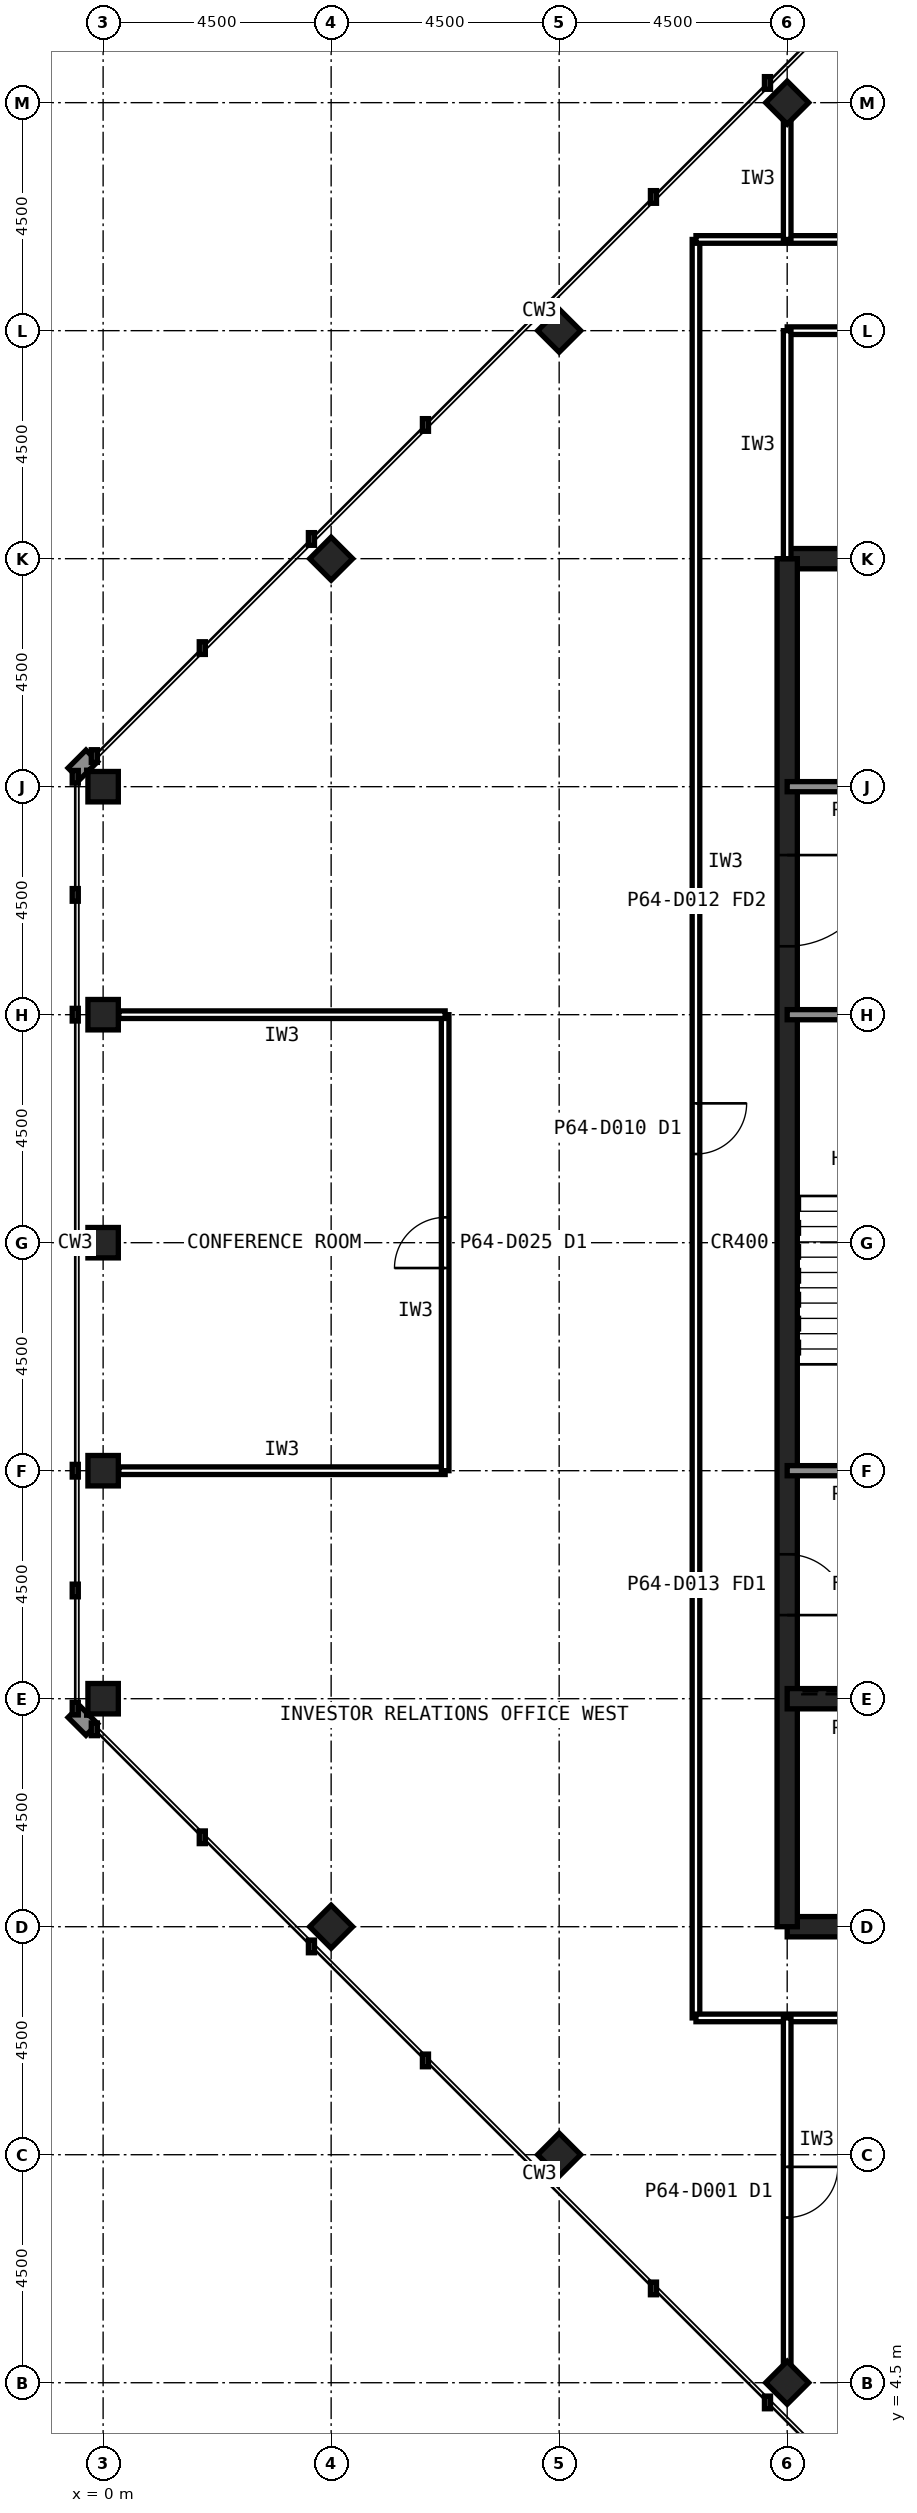
"""IFC4 building model, lengths in metres.
Left out: names, types, materials, properties, quantities, classifications, styles, units other than length and angle.
Written with IfcOpenShell. Run it as: python <this file> out.ifc"""

import sys

from ifc_helpers import new_model, si_unit, direction, frame, frame_2d, origin, origin_2d, place, context, subcontext, project, spatial, rectangle, hollow_rectangle, extrude, element, fill, save


model = new_model("IFC4")
c1 = context("Model", 3, precision=1e-05, world=origin(), true_north=direction((0.0, 1.0)))
c2 = subcontext(c1, "Body", "Model", "MODEL_VIEW")
j1 = project(units=[si_unit("LENGTHUNIT", "METRE"), si_unit("PLANEANGLEUNIT", "RADIAN")], contexts=[c1])
p1 = place(None, origin())
s1 = spatial("IfcSite", under=j1, at=p1, CompositionType="ELEMENT")
p2 = place(p1, origin())
s2 = spatial("IfcBuilding", under=s1, at=p2, CompositionType="ELEMENT")
p3 = place(p2, frame((0.0, 0.0, 270.6)))
s3 = spatial("IfcBuildingStorey", under=s2, at=p3, CompositionType="ELEMENT", Elevation=270.6)
for number, where, z_axis, x_axis in (
    (1, (0.0, 36.0, 0.0), (0.0, 0.0, 1.0), (1.0, 0.0, 0.0)),
    (2, (0.0, 31.5, 0.0), (0.0, 0.0, 1.0), (1.0, 0.0, 0.0)),
    (3, (0.0, 27.0, 0.0), (0.0, 0.0, 1.0), (1.0, 0.0, 0.0)),
    (4, (0.0, 22.5, 0.0), (0.0, 0.0, 1.0), (1.0, 0.0, 0.0)),
    (5, (0.0, 18.0, 0.0), (0.0, 0.0, 1.0), (1.0, 0.0, 0.0)),
    (6, (13.5, 4.5, 0.0), (0.0, 0.0, 1.0), (0.707, 0.707, 0.0)),
    (7, (9.0, 9.0, 0.0), (0.0, 0.0, 1.0), (0.707, 0.707, 0.0)),
    (8, (4.5, 13.5, 0.0), (0.0, 0.0, 1.0), (0.707, 0.707, 0.0)),
    (9, (4.5, 40.5, 0.0), (0.0, 0.0, 1.0), (0.707, 0.707, 0.0)),
    (10, (9.0, 45.0, 0.0), (0.0, 0.0, 1.0), (0.707, 0.707, 0.0)),
    (11, (13.5, 49.5, 0.0), (0.0, 0.0, 1.0), (0.707, 0.707, 0.0)),
):
    element("IfcColumn", number, at=place(p3, frame(where, z_axis=z_axis, x_axis=x_axis)), inside=s3, PredefinedType="COLUMN", context=c2, shape_type="SweptSolid", body=[
        extrude(hollow_rectangle(XDim=0.6, YDim=0.6, WallThickness=0.028, at=origin_2d()), origin(), (0.0, 0.0, 1.0), 4.0),
    ])
for number, where, z_axis, x_axis in (
    (12, (13.5, 13.5, 0.0), (0.0, 0.0, 1.0), (1.0, 0.0, 0.0)),
    (13, (40.5, 40.5, 0.0), (0.0, 0.0, 1.0), (-1.0, 0.0, 0.0)),
):
    element("IfcWall", number, at=place(p3, frame(where, z_axis=z_axis, x_axis=x_axis)), inside=s3, PredefinedType="SHEAR", context=c2, shape_type="SweptSolid", body=[
        extrude(rectangle(XDim=27.0, YDim=0.4, at=frame_2d((13.5, 0.0))), origin(), (0.0, 0.0, 1.0), 4.0),
    ])
p4 = place(p3, frame((13.5, 40.5, 0.0), z_axis=(0.0, 0.0, 1.0), x_axis=(0.0, -1.0, 0.0)))
e14 = element("IfcWall", 14, at=p4, inside=s3, PredefinedType="SHEAR", context=c2, shape_type="SweptSolid", body=[
    extrude(rectangle(XDim=27.0, YDim=0.4, at=frame_2d((13.5, 0.0))), origin(), (0.0, 0.0, 1.0), 4.0),
])
p5 = place(p4, frame((19.65, 0.0, 0.0)))
e15 = element("IfcOpeningElement", 15, at=p5, cuts=e14, PredefinedType="OPENING", context=c2, shape_type="SweptSolid", body=[
    extrude(rectangle(XDim=1.2, YDim=2.1, at=frame_2d((0.6, 1.05))), frame((0.0, 0.21, 0.0), z_axis=(0.0, -1.0, 0.0), x_axis=(1.0, 0.0, 0.0)), (0.0, 0.0, 1.0), 0.42),
])
p6 = place(p4, frame((5.85, 0.0, 0.0)))
e16 = element("IfcOpeningElement", 16, at=p6, cuts=e14, PredefinedType="OPENING", context=c2, shape_type="SweptSolid", body=[
    extrude(rectangle(XDim=1.8, YDim=2.1, at=frame_2d((0.9, 1.05))), frame((0.0, 0.21, 0.0), z_axis=(0.0, -1.0, 0.0), x_axis=(1.0, 0.0, 0.0)), (0.0, 0.0, 1.0), 0.42),
])
p7 = place(p3, frame((13.5, 18.0, 0.0), z_axis=(0.0, 0.0, 1.0), x_axis=(1.0, 0.0, 0.0)))
e17 = element("IfcWall", 17, at=p7, inside=s3, PredefinedType="SHEAR", context=c2, shape_type="SweptSolid", body=[
    extrude(rectangle(XDim=27.0, YDim=0.4, at=frame_2d((13.5, 0.0))), origin(), (0.0, 0.0, 1.0), 4.0),
])
p8 = place(p7, frame((24.3, 0.0, 0.0)))
e18 = element("IfcOpeningElement", 18, at=p8, cuts=e17, PredefinedType="OPENING", context=c2, shape_type="SweptSolid", body=[
    extrude(rectangle(XDim=0.9, YDim=2.1, at=frame_2d((0.45, 1.05))), frame((0.0, 0.21, 0.0), z_axis=(0.0, -1.0, 0.0), x_axis=(1.0, 0.0, 0.0)), (0.0, 0.0, 1.0), 0.42),
])
p9 = place(p7, frame((5.45, 0.0, 0.0)))
e19 = element("IfcOpeningElement", 19, at=p9, cuts=e17, PredefinedType="OPENING", context=c2, shape_type="SweptSolid", body=[
    extrude(rectangle(XDim=1.1, YDim=2.1, at=frame_2d((0.55, 1.05))), frame((0.0, 0.21, 0.0), z_axis=(0.0, -1.0, 0.0), x_axis=(1.0, 0.0, 0.0)), (0.0, 0.0, 1.0), 0.42),
])
p10 = place(p7, frame((8.45, 0.0, 0.0)))
e20 = element("IfcOpeningElement", 20, at=p10, cuts=e17, PredefinedType="OPENING", context=c2, shape_type="SweptSolid", body=[
    extrude(rectangle(XDim=1.1, YDim=2.1, at=frame_2d((0.55, 1.05))), frame((0.0, 0.21, 0.0), z_axis=(0.0, -1.0, 0.0), x_axis=(1.0, 0.0, 0.0)), (0.0, 0.0, 1.0), 0.42),
])
p11 = place(p7, frame((11.45, 0.0, 0.0)))
e21 = element("IfcOpeningElement", 21, at=p11, cuts=e17, PredefinedType="OPENING", context=c2, shape_type="SweptSolid", body=[
    extrude(rectangle(XDim=1.1, YDim=2.1, at=frame_2d((0.55, 1.05))), frame((0.0, 0.21, 0.0), z_axis=(0.0, -1.0, 0.0), x_axis=(1.0, 0.0, 0.0)), (0.0, 0.0, 1.0), 0.42),
])
p12 = place(p7, frame((14.45, 0.0, 0.0)))
e22 = element("IfcOpeningElement", 22, at=p12, cuts=e17, PredefinedType="OPENING", context=c2, shape_type="SweptSolid", body=[
    extrude(rectangle(XDim=1.1, YDim=2.1, at=frame_2d((0.55, 1.05))), frame((0.0, 0.21, 0.0), z_axis=(0.0, -1.0, 0.0), x_axis=(1.0, 0.0, 0.0)), (0.0, 0.0, 1.0), 0.42),
])
p13 = place(p7, frame((17.45, 0.0, 0.0)))
e23 = element("IfcOpeningElement", 23, at=p13, cuts=e17, PredefinedType="OPENING", context=c2, shape_type="SweptSolid", body=[
    extrude(rectangle(XDim=1.1, YDim=2.1, at=frame_2d((0.55, 1.05))), frame((0.0, 0.21, 0.0), z_axis=(0.0, -1.0, 0.0), x_axis=(1.0, 0.0, 0.0)), (0.0, 0.0, 1.0), 0.42),
])
p14 = place(p7, frame((20.45, 0.0, 0.0)))
e24 = element("IfcOpeningElement", 24, at=p14, cuts=e17, PredefinedType="OPENING", context=c2, shape_type="SweptSolid", body=[
    extrude(rectangle(XDim=1.1, YDim=2.1, at=frame_2d((0.55, 1.05))), frame((0.0, 0.21, 0.0), z_axis=(0.0, -1.0, 0.0), x_axis=(1.0, 0.0, 0.0)), (0.0, 0.0, 1.0), 0.42),
])
p15 = place(p7, frame((1.6, 0.0, 0.0)))
e25 = element("IfcOpeningElement", 25, at=p15, cuts=e17, PredefinedType="OPENING", context=c2, shape_type="SweptSolid", body=[
    extrude(rectangle(XDim=1.3, YDim=2.2, at=frame_2d((0.65, 1.1))), frame((0.0, 0.21, 0.0), z_axis=(0.0, -1.0, 0.0), x_axis=(1.0, 0.0, 0.0)), (0.0, 0.0, 1.0), 0.42),
])
p16 = place(p3, frame((13.5, 36.0, 0.0), z_axis=(0.0, 0.0, 1.0), x_axis=(1.0, 0.0, 0.0)))
e26 = element("IfcWall", 26, at=p16, inside=s3, PredefinedType="SOLIDWALL", context=c2, shape_type="SweptSolid", body=[
    extrude(rectangle(XDim=27.0, YDim=0.2, at=frame_2d((13.5, 0.0))), origin(), (0.0, 0.0, 1.0), 3.84),
])
p17 = place(p16, frame((1.8, 0.0, 0.0)))
e27 = element("IfcOpeningElement", 27, at=p17, cuts=e26, PredefinedType="OPENING", context=c2, shape_type="SweptSolid", body=[
    extrude(rectangle(XDim=0.9, YDim=2.1, at=frame_2d((0.45, 1.05))), frame((0.0, 0.11, 0.0), z_axis=(0.0, -1.0, 0.0), x_axis=(1.0, 0.0, 0.0)), (0.0, 0.0, 1.0), 0.22),
])
p18 = place(p16, frame((5.55, 0.0, 0.0)))
e28 = element("IfcOpeningElement", 28, at=p18, cuts=e26, PredefinedType="OPENING", context=c2, shape_type="SweptSolid", body=[
    extrude(rectangle(XDim=0.9, YDim=2.1, at=frame_2d((0.45, 1.05))), frame((0.0, 0.11, 0.0), z_axis=(0.0, -1.0, 0.0), x_axis=(1.0, 0.0, 0.0)), (0.0, 0.0, 1.0), 0.22),
])
p19 = place(p16, frame((14.55, 0.0, 0.0)))
e29 = element("IfcOpeningElement", 29, at=p19, cuts=e26, PredefinedType="OPENING", context=c2, shape_type="SweptSolid", body=[
    extrude(rectangle(XDim=0.9, YDim=2.1, at=frame_2d((0.45, 1.05))), frame((0.0, 0.11, 0.0), z_axis=(0.0, -1.0, 0.0), x_axis=(1.0, 0.0, 0.0)), (0.0, 0.0, 1.0), 0.22),
])
p20 = place(p16, frame((17.55, 0.0, 0.0)))
e30 = element("IfcOpeningElement", 30, at=p20, cuts=e26, PredefinedType="OPENING", context=c2, shape_type="SweptSolid", body=[
    extrude(rectangle(XDim=0.9, YDim=2.1, at=frame_2d((0.45, 1.05))), frame((0.0, 0.11, 0.0), z_axis=(0.0, -1.0, 0.0), x_axis=(1.0, 0.0, 0.0)), (0.0, 0.0, 1.0), 0.22),
])
p21 = place(p16, frame((20.55, 0.0, 0.0)))
e31 = element("IfcOpeningElement", 31, at=p21, cuts=e26, PredefinedType="OPENING", context=c2, shape_type="SweptSolid", body=[
    extrude(rectangle(XDim=0.9, YDim=2.1, at=frame_2d((0.45, 1.05))), frame((0.0, 0.11, 0.0), z_axis=(0.0, -1.0, 0.0), x_axis=(1.0, 0.0, 0.0)), (0.0, 0.0, 1.0), 0.22),
])
p22 = place(p16, frame((24.1, 0.0, 0.0)))
e32 = element("IfcOpeningElement", 32, at=p22, cuts=e26, PredefinedType="OPENING", context=c2, shape_type="SweptSolid", body=[
    extrude(rectangle(XDim=1.3, YDim=2.2, at=frame_2d((0.65, 1.1))), frame((0.0, 0.11, 0.0), z_axis=(0.0, -1.0, 0.0), x_axis=(1.0, 0.0, 0.0)), (0.0, 0.0, 1.0), 0.22),
])
p23 = place(p3, frame((13.5, 22.5, 0.0), z_axis=(0.0, 0.0, 1.0), x_axis=(1.0, 0.0, 0.0)))
e33 = element("IfcWall", 33, at=p23, inside=s3, PredefinedType="SOLIDWALL", context=c2, shape_type="SweptSolid", body=[
    extrude(rectangle(XDim=27.0, YDim=0.2, at=frame_2d((13.5, 0.0))), origin(), (0.0, 0.0, 1.0), 3.84),
])
p24 = place(p23, frame((1.65, 0.0, 0.0)))
e34 = element("IfcOpeningElement", 34, at=p24, cuts=e33, PredefinedType="OPENING", context=c2, shape_type="SweptSolid", body=[
    extrude(rectangle(XDim=1.2, YDim=2.1, at=frame_2d((0.6, 1.05))), frame((0.0, 0.11, 0.0), z_axis=(0.0, -1.0, 0.0), x_axis=(1.0, 0.0, 0.0)), (0.0, 0.0, 1.0), 0.22),
])
p25 = place(p23, frame((6.025, 0.0, 0.0)))
e35 = element("IfcOpeningElement", 35, at=p25, cuts=e33, PredefinedType="OPENING", context=c2, shape_type="SweptSolid", body=[
    extrude(rectangle(XDim=1.0, YDim=2.1, at=frame_2d((0.5, 1.05))), frame((0.0, 0.11, 0.0), z_axis=(0.0, -1.0, 0.0), x_axis=(1.0, 0.0, 0.0)), (0.0, 0.0, 1.0), 0.22),
])
p26 = place(p23, frame((10.525, 0.0, 0.0)))
e36 = element("IfcOpeningElement", 36, at=p26, cuts=e33, PredefinedType="OPENING", context=c2, shape_type="SweptSolid", body=[
    extrude(rectangle(XDim=1.0, YDim=2.1, at=frame_2d((0.5, 1.05))), frame((0.0, 0.11, 0.0), z_axis=(0.0, -1.0, 0.0), x_axis=(1.0, 0.0, 0.0)), (0.0, 0.0, 1.0), 0.22),
])
p27 = place(p23, frame((19.75, 0.0, 0.0)))
e37 = element("IfcOpeningElement", 37, at=p27, cuts=e33, PredefinedType="OPENING", context=c2, shape_type="SweptSolid", body=[
    extrude(rectangle(XDim=1.0, YDim=2.1, at=frame_2d((0.5, 1.05))), frame((0.0, 0.11, 0.0), z_axis=(0.0, -1.0, 0.0), x_axis=(1.0, 0.0, 0.0)), (0.0, 0.0, 1.0), 0.22),
])
p28 = place(p23, frame((15.05, 0.0, 0.0)))
e38 = element("IfcOpeningElement", 38, at=p28, cuts=e33, PredefinedType="OPENING", context=c2, shape_type="SweptSolid", body=[
    extrude(rectangle(XDim=1.4, YDim=2.4, at=frame_2d((0.7, 1.2))), frame((0.0, 0.11, 0.0), z_axis=(0.0, -1.0, 0.0), x_axis=(1.0, 0.0, 0.0)), (0.0, 0.0, 1.0), 0.22),
])
p29 = place(p3, frame((13.5, 31.5, 0.0), z_axis=(0.0, 0.0, 1.0), x_axis=(1.0, 0.0, 0.0)))
e39 = element("IfcWall", 39, at=p29, inside=s3, PredefinedType="SOLIDWALL", context=c2, shape_type="SweptSolid", body=[
    extrude(rectangle(XDim=27.0, YDim=0.2, at=frame_2d((13.5, 0.0))), origin(), (0.0, 0.0, 1.0), 3.84),
])
p30 = place(p29, frame((24.15, 0.0, 0.0)))
e40 = element("IfcOpeningElement", 40, at=p30, cuts=e39, PredefinedType="OPENING", context=c2, shape_type="SweptSolid", body=[
    extrude(rectangle(XDim=1.2, YDim=2.1, at=frame_2d((0.6, 1.05))), frame((0.0, 0.11, 0.0), z_axis=(0.0, -1.0, 0.0), x_axis=(1.0, 0.0, 0.0)), (0.0, 0.0, 1.0), 0.22),
])
p31 = place(p29, frame((15.3, 0.0, 0.0)))
e41 = element("IfcOpeningElement", 41, at=p31, cuts=e39, PredefinedType="OPENING", context=c2, shape_type="SweptSolid", body=[
    extrude(rectangle(XDim=0.9, YDim=2.1, at=frame_2d((0.45, 1.05))), frame((0.0, 0.11, 0.0), z_axis=(0.0, -1.0, 0.0), x_axis=(1.0, 0.0, 0.0)), (0.0, 0.0, 1.0), 0.22),
])
p32 = place(p29, frame((19.8, 0.0, 0.0)))
e42 = element("IfcOpeningElement", 42, at=p32, cuts=e39, PredefinedType="OPENING", context=c2, shape_type="SweptSolid", body=[
    extrude(rectangle(XDim=0.9, YDim=2.1, at=frame_2d((0.45, 1.05))), frame((0.0, 0.11, 0.0), z_axis=(0.0, -1.0, 0.0), x_axis=(1.0, 0.0, 0.0)), (0.0, 0.0, 1.0), 0.22),
])
p33 = place(p3, frame((11.7, 46.8, 0.0), z_axis=(0.0, 0.0, 1.0), x_axis=(0.0, -1.0, 0.0)))
e43 = element("IfcWall", 43, at=p33, inside=s3, PredefinedType="PARTITIONING", context=c2, shape_type="SweptSolid", body=[
    extrude(rectangle(XDim=35.1, YDim=0.15, at=frame_2d((17.55, 0.0))), origin(), (0.0, 0.0, 1.0), 3.84),
])
p34 = place(p33, frame((17.05, 0.0, 0.0)))
e44 = element("IfcOpeningElement", 44, at=p34, cuts=e43, PredefinedType="OPENING", context=c2, shape_type="SweptSolid", body=[
    extrude(rectangle(XDim=1.0, YDim=2.1, at=frame_2d((0.5, 1.05))), frame((0.0, 0.085, 0.0), z_axis=(0.0, -1.0, 0.0), x_axis=(1.0, 0.0, 0.0)), (0.0, 0.0, 1.0), 0.17),
])
p35 = place(p3, frame((24.3, 46.8, 0.0), z_axis=(0.0, 0.0, 1.0), x_axis=(-1.0, 0.0, 0.0)))
e45 = element("IfcWall", 45, at=p35, inside=s3, PredefinedType="PARTITIONING", context=c2, shape_type="SweptSolid", body=[
    extrude(rectangle(XDim=12.6, YDim=0.15, at=frame_2d((6.3, 0.0))), origin(), (0.0, 0.0, 1.0), 3.84),
])
p36 = place(p3, frame((11.7, 11.7, 0.0), z_axis=(0.0, 0.0, 1.0), x_axis=(1.0, 0.0, 0.0)))
e46 = element("IfcWall", 46, at=p36, inside=s3, PredefinedType="PARTITIONING", context=c2, shape_type="SweptSolid", body=[
    extrude(rectangle(XDim=9.0, YDim=0.15, at=frame_2d((4.5, 0.0))), origin(), (0.0, 0.0, 1.0), 3.84),
])
p37 = place(p3, frame((0.31, 22.5, 0.0), z_axis=(0.0, 0.0, 1.0), x_axis=(1.0, 0.0, 0.0)))
e47 = element("IfcWall", 47, at=p37, inside=s3, PredefinedType="PARTITIONING", context=c2, shape_type="SweptSolid", body=[
    extrude(rectangle(XDim=6.44, YDim=0.15, at=frame_2d((3.22, 0.0))), origin(), (0.0, 0.0, 1.0), 2.989),
])
p38 = place(p3, frame((6.75, 22.5, 0.0), z_axis=(0.0, 0.0, 1.0), x_axis=(0.0, 1.0, 0.0)))
e48 = element("IfcWall", 48, at=p38, inside=s3, PredefinedType="PARTITIONING", context=c2, shape_type="SweptSolid", body=[
    extrude(rectangle(XDim=9.0, YDim=0.15, at=frame_2d((4.5, 0.0))), origin(), (0.0, 0.0, 1.0), 3.84),
])
p39 = place(p38, frame((4.0, 0.0, 0.0)))
e49 = element("IfcOpeningElement", 49, at=p39, cuts=e48, PredefinedType="OPENING", context=c2, shape_type="SweptSolid", body=[
    extrude(rectangle(XDim=1.0, YDim=2.1, at=frame_2d((0.5, 1.05))), frame((0.0, 0.085, 0.0), z_axis=(0.0, -1.0, 0.0), x_axis=(1.0, 0.0, 0.0)), (0.0, 0.0, 1.0), 0.17),
])
p40 = place(p3, frame((6.75, 31.5, 0.0), z_axis=(0.0, 0.0, 1.0), x_axis=(-1.0, 0.0, 0.0)))
e50 = element("IfcWall", 50, at=p40, inside=s3, PredefinedType="PARTITIONING", context=c2, shape_type="SweptSolid", body=[
    extrude(rectangle(XDim=6.44, YDim=0.15, at=frame_2d((3.22, 0.0))), origin(), (0.0, 0.0, 1.0), 2.989),
])
p41 = place(p3, frame((22.5, 45.0, 0.0), z_axis=(0.0, 0.0, 1.0), x_axis=(-1.0, 0.0, 0.0)))
e51 = element("IfcWall", 51, at=p41, inside=s3, PredefinedType="PARTITIONING", context=c2, shape_type="SweptSolid", body=[
    extrude(rectangle(XDim=9.0, YDim=0.15, at=frame_2d((4.5, 0.0))), origin(), (0.0, 0.0, 1.0), 3.84),
])
p42 = place(p3, frame((13.5, 45.0, 0.0), z_axis=(0.0, 0.0, 1.0), x_axis=(0.0, -1.0, 0.0)))
e52 = element("IfcWall", 52, at=p42, inside=s3, PredefinedType="PARTITIONING", context=c2, shape_type="SweptSolid", body=[
    extrude(rectangle(XDim=4.5, YDim=0.15, at=frame_2d((2.25, 0.0))), origin(), (0.0, 0.0, 1.0), 2.989),
])
p43 = place(p3, frame((13.5, 46.8, 0.0), z_axis=(0.0, 0.0, 1.0), x_axis=(0.0, 1.0, 0.0)))
e53 = element("IfcWall", 53, at=p43, inside=s3, PredefinedType="PARTITIONING", context=c2, shape_type="SweptSolid", body=[
    extrude(rectangle(XDim=2.38, YDim=0.15, at=frame_2d((1.19, 0.0))), origin(), (0.0, 0.0, 1.0), 2.989),
])
p44 = place(p3, frame((13.5, 11.7, 0.0), z_axis=(0.0, 0.0, 1.0), x_axis=(0.0, -1.0, 0.0)))
e54 = element("IfcWall", 54, at=p44, inside=s3, PredefinedType="PARTITIONING", context=c2, shape_type="SweptSolid", body=[
    extrude(rectangle(XDim=6.88, YDim=0.15, at=frame_2d((3.44, 0.0))), origin(), (0.0, 0.0, 1.0), 2.989),
])
p45 = place(p44, frame((2.94, 0.0, 0.0)))
e55 = element("IfcOpeningElement", 55, at=p45, cuts=e54, PredefinedType="OPENING", context=c2, shape_type="SweptSolid", body=[
    extrude(rectangle(XDim=1.0, YDim=2.1, at=frame_2d((0.5, 1.05))), frame((0.0, 0.085, 0.0), z_axis=(0.0, -1.0, 0.0), x_axis=(1.0, 0.0, 0.0)), (0.0, 0.0, 1.0), 0.17),
])
p46 = place(p5, origin())
e56 = element("IfcDoor", 56, at=p46, inside=s3, OperationType="SINGLE_SWING_RIGHT", PredefinedType="DOOR", context=c2, shape_type="SweptSolid", body=[
    extrude(rectangle(XDim=1.2, YDim=2.1, at=frame_2d((0.6, 1.05))), frame((0.0, 0.025, 0.0), z_axis=(0.0, -1.0, 0.0), x_axis=(1.0, 0.0, 0.0)), (0.0, 0.0, 1.0), 0.05),
])
fill(e15, e56)
p47 = place(p6, origin())
e57 = element("IfcDoor", 57, at=p47, inside=s3, OperationType="SINGLE_SWING_LEFT", PredefinedType="DOOR", context=c2, shape_type="SweptSolid", body=[
    extrude(rectangle(XDim=1.8, YDim=2.1, at=frame_2d((0.9, 1.05))), frame((0.0, 0.025, 0.0), z_axis=(0.0, -1.0, 0.0), x_axis=(1.0, 0.0, 0.0)), (0.0, 0.0, 1.0), 0.05),
])
fill(e16, e57)
p48 = place(p34, origin())
e58 = element("IfcDoor", 58, at=p48, inside=s3, OperationType="SINGLE_SWING_LEFT", PredefinedType="DOOR", context=c2, shape_type="SweptSolid", body=[
    extrude(rectangle(XDim=1.0, YDim=2.1, at=frame_2d((0.5, 1.05))), frame((0.0, 0.025, 0.0), z_axis=(0.0, -1.0, 0.0), x_axis=(1.0, 0.0, 0.0)), (0.0, 0.0, 1.0), 0.05),
])
fill(e44, e58)
p49 = place(p39, origin())
e59 = element("IfcDoor", 59, at=p49, inside=s3, OperationType="SINGLE_SWING_LEFT", PredefinedType="DOOR", context=c2, shape_type="SweptSolid", body=[
    extrude(rectangle(XDim=1.0, YDim=2.1, at=frame_2d((0.5, 1.05))), frame((0.0, 0.025, 0.0), z_axis=(0.0, -1.0, 0.0), x_axis=(1.0, 0.0, 0.0)), (0.0, 0.0, 1.0), 0.05),
])
fill(e49, e59)
p50 = place(p45, origin())
e60 = element("IfcDoor", 60, at=p50, inside=s3, OperationType="SINGLE_SWING_LEFT", PredefinedType="DOOR", context=c2, shape_type="SweptSolid", body=[
    extrude(rectangle(XDim=1.0, YDim=2.1, at=frame_2d((0.5, 1.05))), frame((0.0, 0.025, 0.0), z_axis=(0.0, -1.0, 0.0), x_axis=(1.0, 0.0, 0.0)), (0.0, 0.0, 1.0), 0.05),
])
fill(e55, e60)
save(model, sys.argv[1])
